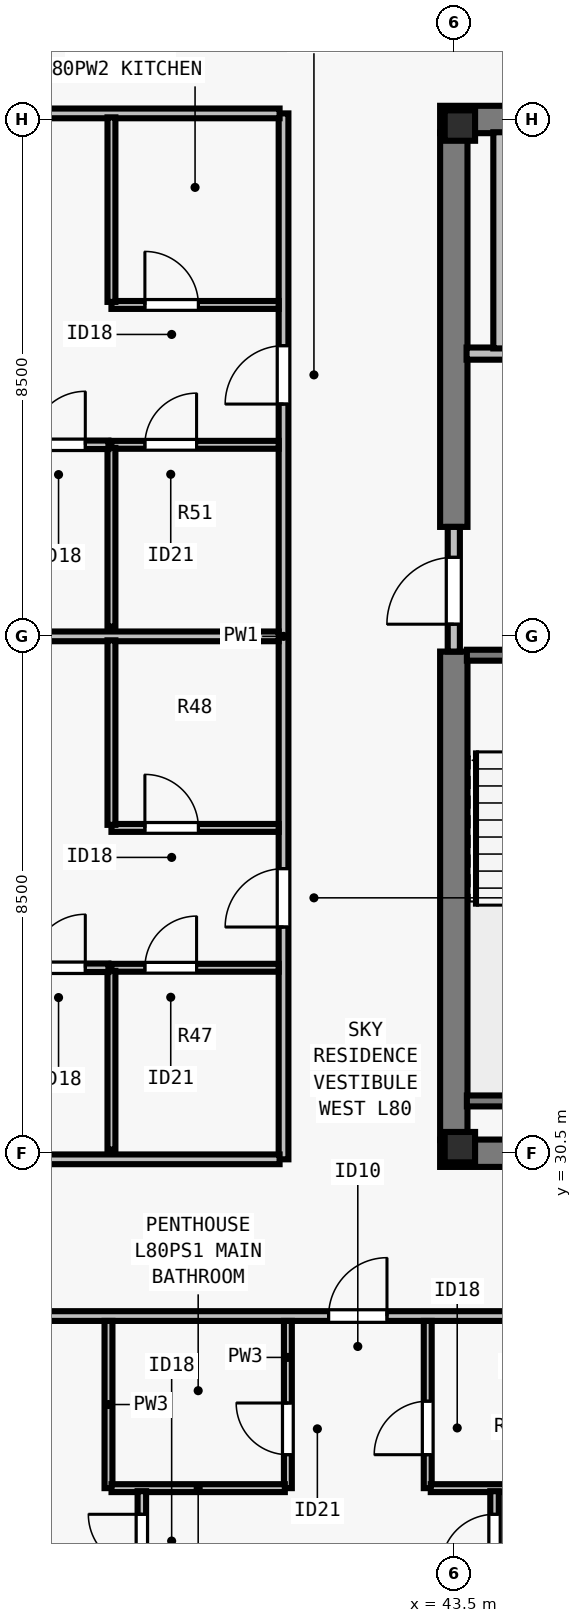
"""IFC4 building model, lengths in metres.
Left out: names, types, materials, properties, quantities, classifications, styles, units other than length and angle.
Written with IfcOpenShell. Run it as: python <this file> out.ifc"""

import sys

from ifc_helpers import new_model, si_unit, direction, frame, frame_2d, origin, origin_2d, place, context, subcontext, project, spatial, rectangle, i_section, extrude, element, fill, save


model = new_model("IFC4")
c1 = context("Model", 3, precision=1e-05, world=origin(), true_north=direction((0.0, 1.0)))
c2 = subcontext(c1, "Body", "Model", "MODEL_VIEW")
j1 = project(units=[si_unit("LENGTHUNIT", "METRE"), si_unit("PLANEANGLEUNIT", "RADIAN")], contexts=[c1])
p1 = place(None, origin())
s1 = spatial("IfcSite", under=j1, at=p1, CompositionType="ELEMENT")
p2 = place(p1, origin())
s2 = spatial("IfcBuilding", under=s1, at=p2, CompositionType="ELEMENT")
p3 = place(p2, frame((0.0, 0.0, 291.0)))
s3 = spatial("IfcBuildingStorey", under=s2, at=p3, CompositionType="ELEMENT", Elevation=291.0)
for number, where, z_axis, x_axis in (
    (1, (43.6, 30.6, 0.0), (0.0, 0.0, 1.0), (1.0, 0.0, 0.0)),
    (2, (43.6, 47.4, 0.0), (0.0, 0.0, 1.0), (1.0, 0.0, 0.0)),
):
    element("IfcColumn", number, at=place(p3, frame(where, z_axis=z_axis, x_axis=x_axis)), inside=s3, PredefinedType="COLUMN", context=c2, shape_type="SweptSolid", body=[
        extrude(i_section(OverallWidth=0.5, OverallDepth=0.5, WebThickness=0.028, FlangeThickness=0.045, at=origin_2d()), origin(), (0.0, 0.0, 1.0), 3.5),
    ])
for number, where, z_axis, x_axis in (
    (3, (43.275, 30.5, 0.0), (0.0, 0.0, 1.0), (1.0, 0.0, 0.0)),
    (4, (43.275, 47.5, 0.0), (0.0, 0.0, 1.0), (1.0, 0.0, 0.0)),
):
    element("IfcWall", number, at=place(p3, frame(where, z_axis=z_axis, x_axis=x_axis)), inside=s3, PredefinedType="SHEAR", context=c2, shape_type="SweptSolid", body=[
        extrude(rectangle(XDim=17.45, YDim=0.45, at=frame_2d((8.725, 0.0))), origin(), (0.0, 0.0, 1.0), 3.29),
    ])
p4 = place(p3, frame((43.5, 30.715, 0.0), z_axis=(0.0, 0.0, 1.0), x_axis=(0.0, 1.0, 0.0)))
e5 = element("IfcWall", 5, at=p4, inside=s3, PredefinedType="SHEAR", context=c2, shape_type="SweptSolid", body=[
    extrude(rectangle(XDim=8.035, YDim=0.45, at=frame_2d((4.018, 0.0))), origin(), (0.0, 0.0, 1.0), 3.29),
])
p5 = place(p3, frame((43.5, 40.8, 0.0), z_axis=(0.0, 0.0, 1.0), x_axis=(0.0, 1.0, 0.0)))
e6 = element("IfcWall", 6, at=p5, inside=s3, PredefinedType="SHEAR", context=c2, shape_type="SweptSolid", body=[
    extrude(rectangle(XDim=6.485, YDim=0.45, at=frame_2d((3.242, 0.0))), origin(), (0.0, 0.0, 1.0), 3.29),
])
p6 = place(p3, frame((43.5, 38.75, 0.0), z_axis=(0.0, 0.0, 1.0), x_axis=(0.0, 1.0, 0.0)))
e7 = element("IfcWall", 7, at=p6, inside=s3, PredefinedType="SOLIDWALL", context=c2, shape_type="SweptSolid", body=[
    extrude(rectangle(XDim=2.05, YDim=0.2, at=frame_2d((1.025, 0.0))), origin(), (0.0, 0.0, 1.0), 3.29),
])
p7 = place(p6, frame((0.45, 0.0, 0.0)))
e8 = element("IfcOpeningElement", 8, at=p7, cuts=e7, PredefinedType="OPENING", context=c2, shape_type="SweptSolid", body=[
    extrude(rectangle(XDim=1.1, YDim=2.15, at=frame_2d((0.55, 1.075))), frame((0.0, 0.11, 0.0), z_axis=(0.0, -1.0, 0.0), x_axis=(1.0, 0.0, 0.0)), (0.0, 0.0, 1.0), 0.22),
])
p8 = place(p3, frame((43.71, 43.65, 0.0), z_axis=(0.0, 0.0, 1.0), x_axis=(1.0, 0.0, 0.0)))
e9 = element("IfcWall", 9, at=p8, inside=s3, PredefinedType="SOLIDWALL", context=c2, shape_type="SweptSolid", body=[
    extrude(rectangle(XDim=3.555, YDim=0.2, at=frame_2d((1.777, 0.0))), origin(), (0.0, 0.0, 1.0), 3.29),
])
p9 = place(p8, frame((1.16, 0.0, 0.0)))
e10 = element("IfcOpeningElement", 10, at=p9, cuts=e9, PredefinedType="OPENING", context=c2, shape_type="SweptSolid", body=[
    extrude(rectangle(XDim=1.1, YDim=2.2, at=frame_2d((0.55, 1.1))), frame((0.0, 0.11, 0.0), z_axis=(0.0, -1.0, 0.0), x_axis=(1.0, 0.0, 0.0)), (0.0, 0.0, 1.0), 0.22),
])
p10 = place(p3, frame((44.25, 43.735, 0.0), z_axis=(0.0, 0.0, 1.0), x_axis=(0.0, 1.0, 0.0)))
e11 = element("IfcWall", 11, at=p10, inside=s3, PredefinedType="SOLIDWALL", context=c2, shape_type="SweptSolid", body=[
    extrude(rectangle(XDim=3.555, YDim=0.2, at=frame_2d((1.777, 0.0))), origin(), (0.0, 0.0, 1.0), 3.29),
])
p11 = place(p3, frame((31.285, 27.823, 0.0), z_axis=(0.0, 0.0, 1.0), x_axis=(1.0, 0.0, 0.0)))
e12 = element("IfcWall", 12, at=p11, inside=s3, PredefinedType="PARTITIONING", context=c2, shape_type="SweptSolid", body=[
    extrude(rectangle(XDim=41.3, YDim=0.16, at=frame_2d((20.65, 0.0))), origin(), (0.0, 0.0, 1.0), 3.009),
])
p12 = place(p11, frame((10.156, 0.0, 0.0)))
e13 = element("IfcOpeningElement", 13, at=p12, cuts=e12, PredefinedType="OPENING", context=c2, shape_type="SweptSolid", body=[
    extrude(rectangle(XDim=0.96, YDim=2.18, at=frame_2d((0.48, 1.09))), frame((0.0, 0.09, 0.0), z_axis=(0.0, -1.0, 0.0), x_axis=(1.0, 0.0, 0.0)), (0.0, 0.0, 1.0), 0.18),
])
p13 = place(p11, frame((30.736, 0.0, 0.0)))
e14 = element("IfcOpeningElement", 14, at=p13, cuts=e12, PredefinedType="OPENING", context=c2, shape_type="SweptSolid", body=[
    extrude(rectangle(XDim=0.96, YDim=2.18, at=frame_2d((0.48, 1.09))), frame((0.0, 0.09, 0.0), z_axis=(0.0, -1.0, 0.0), x_axis=(1.0, 0.0, 0.0)), (0.0, 0.0, 1.0), 0.18),
])
p14 = place(p3, frame((40.7, 30.4, 0.0), z_axis=(0.0, 0.0, 1.0), x_axis=(0.0, 1.0, 0.0)))
e15 = element("IfcWall", 15, at=p14, inside=s3, PredefinedType="PARTITIONING", context=c2, shape_type="SweptSolid", body=[
    extrude(rectangle(XDim=17.2, YDim=0.16, at=frame_2d((8.6, 0.0))), origin(), (0.0, 0.0, 1.0), 3.009),
])
p15 = place(p14, frame((3.82, 0.0, 0.0)))
e16 = element("IfcOpeningElement", 16, at=p15, cuts=e15, PredefinedType="OPENING", context=c2, shape_type="SweptSolid", body=[
    extrude(rectangle(XDim=0.96, YDim=2.18, at=frame_2d((0.48, 1.09))), frame((0.0, 0.09, 0.0), z_axis=(0.0, -1.0, 0.0), x_axis=(1.0, 0.0, 0.0)), (0.0, 0.0, 1.0), 0.18),
])
p16 = place(p14, frame((12.42, 0.0, 0.0)))
e17 = element("IfcOpeningElement", 17, at=p16, cuts=e15, PredefinedType="OPENING", context=c2, shape_type="SweptSolid", body=[
    extrude(rectangle(XDim=0.96, YDim=2.18, at=frame_2d((0.48, 1.09))), frame((0.0, 0.09, 0.0), z_axis=(0.0, -1.0, 0.0), x_axis=(1.0, 0.0, 0.0)), (0.0, 0.0, 1.0), 0.18),
])
for number, where, z_axis, x_axis in (
    (18, (31.285, 30.4, 0.0), (0.0, 0.0, 1.0), (1.0, 0.0, 0.0)),
    (19, (31.285, 47.6, 0.0), (0.0, 0.0, 1.0), (1.0, 0.0, 0.0)),
):
    element("IfcWall", number, at=place(p3, frame(where, z_axis=z_axis, x_axis=x_axis)), inside=s3, PredefinedType="PARTITIONING", context=c2, shape_type="SweptSolid", body=[
        extrude(rectangle(XDim=9.35, YDim=0.16, at=frame_2d((4.675, 0.0))), origin(), (0.0, 0.0, 1.0), 3.29),
    ])
p17 = place(p3, frame((37.821, 24.992, 0.0), z_axis=(0.0, 0.0, 1.0), x_axis=(0.0, 1.0, 0.0)))
e20 = element("IfcWall", 20, at=p17, inside=s3, PredefinedType="PLUMBINGWALL", context=c2, shape_type="SweptSolid", body=[
    extrude(rectangle(XDim=2.75, YDim=0.13, at=frame_2d((1.375, 0.0))), origin(), (0.0, 0.0, 1.0), 3.29),
])
p18 = place(p3, frame((40.771, 24.992, 0.0), z_axis=(0.0, 0.0, 1.0), x_axis=(0.0, 1.0, 0.0)))
e21 = element("IfcWall", 21, at=p18, inside=s3, PredefinedType="PLUMBINGWALL", context=c2, shape_type="SweptSolid", body=[
    extrude(rectangle(XDim=2.75, YDim=0.13, at=frame_2d((1.375, 0.0))), origin(), (0.0, 0.0, 1.0), 2.653),
])
p19 = place(p18, frame((0.55, 0.0, 0.0)))
e22 = element("IfcOpeningElement", 22, at=p19, cuts=e21, PredefinedType="OPENING", context=c2, shape_type="SweptSolid", body=[
    extrude(rectangle(XDim=0.85, YDim=2.08, at=frame_2d((0.425, 1.04))), frame((0.0, 0.075, 0.0), z_axis=(0.0, -1.0, 0.0), x_axis=(1.0, 0.0, 0.0)), (0.0, 0.0, 1.0), 0.15),
])
p20 = place(p3, frame((37.871, 24.992, 0.0), z_axis=(0.0, 0.0, 1.0), x_axis=(1.0, 0.0, 0.0)))
e23 = element("IfcWall", 23, at=p20, inside=s3, PredefinedType="PLUMBINGWALL", context=c2, shape_type="SweptSolid", body=[
    extrude(rectangle(XDim=2.85, YDim=0.13, at=frame_2d((1.425, 0.0))), origin(), (0.0, 0.0, 1.0), 3.29),
])
p21 = place(p3, frame((43.071, 24.992, 0.0), z_axis=(0.0, 0.0, 1.0), x_axis=(0.0, 1.0, 0.0)))
e24 = element("IfcWall", 24, at=p21, inside=s3, PredefinedType="PLUMBINGWALL", context=c2, shape_type="SweptSolid", body=[
    extrude(rectangle(XDim=2.75, YDim=0.13, at=frame_2d((1.375, 0.0))), origin(), (0.0, 0.0, 1.0), 3.29),
])
p22 = place(p21, frame((0.55, 0.0, 0.0)))
e25 = element("IfcOpeningElement", 25, at=p22, cuts=e24, PredefinedType="OPENING", context=c2, shape_type="SweptSolid", body=[
    extrude(rectangle(XDim=0.88, YDim=2.1, at=frame_2d((0.44, 1.05))), frame((0.0, 0.075, 0.0), z_axis=(0.0, -1.0, 0.0), x_axis=(1.0, 0.0, 0.0)), (0.0, 0.0, 1.0), 0.15),
])
p23 = place(p3, frame((43.121, 24.992, 0.0), z_axis=(0.0, 0.0, 1.0), x_axis=(1.0, 0.0, 0.0)))
e26 = element("IfcWall", 26, at=p23, inside=s3, PredefinedType="PLUMBINGWALL", context=c2, shape_type="SweptSolid", body=[
    extrude(rectangle(XDim=3.15, YDim=0.13, at=frame_2d((1.575, 0.0))), origin(), (0.0, 0.0, 1.0), 3.29),
])
p24 = place(p3, frame((38.37, 18.38, 0.0), z_axis=(0.0, 0.0, 1.0), x_axis=(0.0, 1.0, 0.0)))
e27 = element("IfcWall", 27, at=p24, inside=s3, PredefinedType="PARTITIONING", context=c2, shape_type="SweptSolid", body=[
    extrude(rectangle(XDim=6.562, YDim=0.14, at=frame_2d((3.281, 0.0))), origin(), (0.0, 0.0, 1.0), 2.653),
])
p25 = place(p24, frame((5.302, 0.0, 0.0)))
e28 = element("IfcOpeningElement", 28, at=p25, cuts=e27, PredefinedType="OPENING", context=c2, shape_type="SweptSolid", body=[
    extrude(rectangle(XDim=0.88, YDim=2.1, at=frame_2d((0.44, 1.05))), frame((0.0, 0.08, 0.0), z_axis=(0.0, -1.0, 0.0), x_axis=(1.0, 0.0, 0.0)), (0.0, 0.0, 1.0), 0.16),
])
p26 = place(p3, frame((44.17, 18.38, 0.0), z_axis=(0.0, 0.0, 1.0), x_axis=(0.0, 1.0, 0.0)))
e29 = element("IfcWall", 29, at=p26, inside=s3, PredefinedType="PARTITIONING", context=c2, shape_type="SweptSolid", body=[
    extrude(rectangle(XDim=6.562, YDim=0.14, at=frame_2d((3.281, 0.0))), origin(), (0.0, 0.0, 1.0), 3.29),
])
p27 = place(p26, frame((5.302, 0.0, 0.0)))
e30 = element("IfcOpeningElement", 30, at=p27, cuts=e29, PredefinedType="OPENING", context=c2, shape_type="SweptSolid", body=[
    extrude(rectangle(XDim=0.88, YDim=2.1, at=frame_2d((0.44, 1.05))), frame((0.0, 0.08, 0.0), z_axis=(0.0, -1.0, 0.0), x_axis=(1.0, 0.0, 0.0)), (0.0, 0.0, 1.0), 0.16),
])
p28 = place(p3, frame((31.285, 39.0, 0.0), z_axis=(0.0, 0.0, 1.0), x_axis=(1.0, 0.0, 0.0)))
e31 = element("IfcWall", 31, at=p28, inside=s3, PredefinedType="PARTITIONING", context=c2, shape_type="SweptSolid", body=[
    extrude(rectangle(XDim=9.335, YDim=0.16, at=frame_2d((4.667, 0.0))), origin(), (0.0, 0.0, 1.0), 3.29),
])
p29 = place(p3, frame((37.87, 33.55, 0.0), z_axis=(0.0, 0.0, 1.0), x_axis=(1.0, 0.0, 0.0)))
e32 = element("IfcWall", 32, at=p29, inside=s3, PredefinedType="PLUMBINGWALL", context=c2, shape_type="SweptSolid", body=[
    extrude(rectangle(XDim=2.75, YDim=0.13, at=frame_2d((1.375, 0.0))), origin(), (0.0, 0.0, 1.0), 3.29),
])
p30 = place(p29, frame((0.55, 0.0, 0.0)))
e33 = element("IfcOpeningElement", 33, at=p30, cuts=e32, PredefinedType="OPENING", context=c2, shape_type="SweptSolid", body=[
    extrude(rectangle(XDim=0.85, YDim=2.08, at=frame_2d((0.425, 1.04))), frame((0.0, 0.075, 0.0), z_axis=(0.0, -1.0, 0.0), x_axis=(1.0, 0.0, 0.0)), (0.0, 0.0, 1.0), 0.15),
])
p31 = place(p3, frame((37.87, 30.56, 0.0), z_axis=(0.0, 0.0, 1.0), x_axis=(0.0, 1.0, 0.0)))
e34 = element("IfcWall", 34, at=p31, inside=s3, PredefinedType="PLUMBINGWALL", context=c2, shape_type="SweptSolid", body=[
    extrude(rectangle(XDim=2.94, YDim=0.13, at=frame_2d((1.47, 0.0))), origin(), (0.0, 0.0, 1.0), 3.29),
])
p32 = place(p3, frame((37.87, 35.85, 0.0), z_axis=(0.0, 0.0, 1.0), x_axis=(1.0, 0.0, 0.0)))
e35 = element("IfcWall", 35, at=p32, inside=s3, PredefinedType="PLUMBINGWALL", context=c2, shape_type="SweptSolid", body=[
    extrude(rectangle(XDim=2.75, YDim=0.13, at=frame_2d((1.375, 0.0))), origin(), (0.0, 0.0, 1.0), 3.29),
])
p33 = place(p32, frame((0.55, 0.0, 0.0)))
e36 = element("IfcOpeningElement", 36, at=p33, cuts=e35, PredefinedType="OPENING", context=c2, shape_type="SweptSolid", body=[
    extrude(rectangle(XDim=0.88, YDim=2.1, at=frame_2d((0.44, 1.05))), frame((0.0, 0.075, 0.0), z_axis=(0.0, -1.0, 0.0), x_axis=(1.0, 0.0, 0.0)), (0.0, 0.0, 1.0), 0.15),
])
p34 = place(p3, frame((37.87, 35.9, 0.0), z_axis=(0.0, 0.0, 1.0), x_axis=(0.0, 1.0, 0.0)))
e37 = element("IfcWall", 37, at=p34, inside=s3, PredefinedType="PLUMBINGWALL", context=c2, shape_type="SweptSolid", body=[
    extrude(rectangle(XDim=3.035, YDim=0.13, at=frame_2d((1.518, 0.0))), origin(), (0.0, 0.0, 1.0), 3.29),
])
p35 = place(p3, frame((31.38, 33.55, 0.0), z_axis=(0.0, 0.0, 1.0), x_axis=(1.0, 0.0, 0.0)))
e38 = element("IfcWall", 38, at=p35, inside=s3, PredefinedType="PARTITIONING", context=c2, shape_type="SweptSolid", body=[
    extrude(rectangle(XDim=6.44, YDim=0.14, at=frame_2d((3.22, 0.0))), origin(), (0.0, 0.0, 1.0), 2.653),
])
p36 = place(p35, frame((5.18, 0.0, 0.0)))
e39 = element("IfcOpeningElement", 39, at=p36, cuts=e38, PredefinedType="OPENING", context=c2, shape_type="SweptSolid", body=[
    extrude(rectangle(XDim=0.88, YDim=2.1, at=frame_2d((0.44, 1.05))), frame((0.0, 0.08, 0.0), z_axis=(0.0, -1.0, 0.0), x_axis=(1.0, 0.0, 0.0)), (0.0, 0.0, 1.0), 0.16),
])
p37 = place(p3, frame((37.87, 42.15, 0.0), z_axis=(0.0, 0.0, 1.0), x_axis=(1.0, 0.0, 0.0)))
e40 = element("IfcWall", 40, at=p37, inside=s3, PredefinedType="PLUMBINGWALL", context=c2, shape_type="SweptSolid", body=[
    extrude(rectangle(XDim=2.75, YDim=0.13, at=frame_2d((1.375, 0.0))), origin(), (0.0, 0.0, 1.0), 3.29),
])
p38 = place(p37, frame((0.55, 0.0, 0.0)))
e41 = element("IfcOpeningElement", 41, at=p38, cuts=e40, PredefinedType="OPENING", context=c2, shape_type="SweptSolid", body=[
    extrude(rectangle(XDim=0.85, YDim=2.08, at=frame_2d((0.425, 1.04))), frame((0.0, 0.075, 0.0), z_axis=(0.0, -1.0, 0.0), x_axis=(1.0, 0.0, 0.0)), (0.0, 0.0, 1.0), 0.15),
])
p39 = place(p3, frame((37.87, 39.16, 0.0), z_axis=(0.0, 0.0, 1.0), x_axis=(0.0, 1.0, 0.0)))
e42 = element("IfcWall", 42, at=p39, inside=s3, PredefinedType="PLUMBINGWALL", context=c2, shape_type="SweptSolid", body=[
    extrude(rectangle(XDim=2.94, YDim=0.13, at=frame_2d((1.47, 0.0))), origin(), (0.0, 0.0, 1.0), 3.009),
])
p40 = place(p3, frame((37.87, 44.45, 0.0), z_axis=(0.0, 0.0, 1.0), x_axis=(1.0, 0.0, 0.0)))
e43 = element("IfcWall", 43, at=p40, inside=s3, PredefinedType="PLUMBINGWALL", context=c2, shape_type="SweptSolid", body=[
    extrude(rectangle(XDim=2.75, YDim=0.13, at=frame_2d((1.375, 0.0))), origin(), (0.0, 0.0, 1.0), 3.29),
])
p41 = place(p40, frame((0.55, 0.0, 0.0)))
e44 = element("IfcOpeningElement", 44, at=p41, cuts=e43, PredefinedType="OPENING", context=c2, shape_type="SweptSolid", body=[
    extrude(rectangle(XDim=0.88, YDim=2.1, at=frame_2d((0.44, 1.05))), frame((0.0, 0.075, 0.0), z_axis=(0.0, -1.0, 0.0), x_axis=(1.0, 0.0, 0.0)), (0.0, 0.0, 1.0), 0.15),
])
p42 = place(p3, frame((37.87, 44.5, 0.0), z_axis=(0.0, 0.0, 1.0), x_axis=(0.0, 1.0, 0.0)))
e45 = element("IfcWall", 45, at=p42, inside=s3, PredefinedType="PLUMBINGWALL", context=c2, shape_type="SweptSolid", body=[
    extrude(rectangle(XDim=3.035, YDim=0.13, at=frame_2d((1.518, 0.0))), origin(), (0.0, 0.0, 1.0), 3.29),
])
p43 = place(p3, frame((31.38, 42.15, 0.0), z_axis=(0.0, 0.0, 1.0), x_axis=(1.0, 0.0, 0.0)))
e46 = element("IfcWall", 46, at=p43, inside=s3, PredefinedType="PARTITIONING", context=c2, shape_type="SweptSolid", body=[
    extrude(rectangle(XDim=6.44, YDim=0.14, at=frame_2d((3.22, 0.0))), origin(), (0.0, 0.0, 1.0), 3.29),
])
p44 = place(p43, frame((5.18, 0.0, 0.0)))
e47 = element("IfcOpeningElement", 47, at=p44, cuts=e46, PredefinedType="OPENING", context=c2, shape_type="SweptSolid", body=[
    extrude(rectangle(XDim=0.88, YDim=2.1, at=frame_2d((0.44, 1.05))), frame((0.0, 0.08, 0.0), z_axis=(0.0, -1.0, 0.0), x_axis=(1.0, 0.0, 0.0)), (0.0, 0.0, 1.0), 0.16),
])
p45 = place(p3, frame((43.715, 38.69, 0.0), z_axis=(0.0, 0.0, 1.0), x_axis=(1.0, 0.0, 0.0)))
e48 = element("IfcWall", 48, at=p45, inside=s3, PredefinedType="SOLIDWALL", context=c2, shape_type="SweptSolid", body=[
    extrude(rectangle(XDim=3.28, YDim=0.18, at=frame_2d((1.64, 0.0))), origin(), (0.0, 0.0, 1.0), 3.29),
])
p46 = place(p45, frame((1.165, 0.0, 0.0)))
e49 = element("IfcOpeningElement", 49, at=p46, cuts=e48, PredefinedType="OPENING", context=c2, shape_type="SweptSolid", body=[
    extrude(rectangle(XDim=0.95, YDim=2.15, at=frame_2d((0.475, 1.075))), frame((0.0, 0.1, 0.0), z_axis=(0.0, -1.0, 0.0), x_axis=(1.0, 0.0, 0.0)), (0.0, 0.0, 1.0), 0.2),
])
p47 = place(p3, frame((43.715, 31.36, 0.0), z_axis=(0.0, 0.0, 1.0), x_axis=(1.0, 0.0, 0.0)))
e50 = element("IfcWall", 50, at=p47, inside=s3, PredefinedType="SOLIDWALL", context=c2, shape_type="SweptSolid", body=[
    extrude(rectangle(XDim=3.28, YDim=0.18, at=frame_2d((1.64, 0.0))), origin(), (0.0, 0.0, 1.0), 3.29),
])
p48 = place(p7, origin())
e51 = element("IfcDoor", 51, at=p48, inside=s3, OperationType="SINGLE_SWING_LEFT", PredefinedType="DOOR", context=c2, shape_type="SweptSolid", body=[
    extrude(rectangle(XDim=1.1, YDim=2.15, at=frame_2d((0.55, 1.075))), frame((0.0, 0.025, 0.0), z_axis=(0.0, -1.0, 0.0), x_axis=(1.0, 0.0, 0.0)), (0.0, 0.0, 1.0), 0.05),
])
fill(e8, e51)
p49 = place(p19, origin())
e52 = element("IfcDoor", 52, at=p49, inside=s3, OperationType="SINGLE_SWING_RIGHT", PredefinedType="DOOR", context=c2, shape_type="SweptSolid", body=[
    extrude(rectangle(XDim=0.85, YDim=2.08, at=frame_2d((0.425, 1.04))), frame((0.0, 0.025, 0.0), z_axis=(0.0, -1.0, 0.0), x_axis=(1.0, 0.0, 0.0)), (0.0, 0.0, 1.0), 0.05),
])
fill(e22, e52)
p50 = place(p22, origin())
e53 = element("IfcDoor", 53, at=p50, inside=s3, OperationType="SINGLE_SWING_LEFT", PredefinedType="DOOR", context=c2, shape_type="SweptSolid", body=[
    extrude(rectangle(XDim=0.88, YDim=2.1, at=frame_2d((0.44, 1.05))), frame((0.0, 0.025, 0.0), z_axis=(0.0, -1.0, 0.0), x_axis=(1.0, 0.0, 0.0)), (0.0, 0.0, 1.0), 0.05),
])
fill(e25, e53)
p51 = place(p25, origin())
e54 = element("IfcDoor", 54, at=p51, inside=s3, OperationType="SINGLE_SWING_RIGHT", PredefinedType="DOOR", context=c2, shape_type="SweptSolid", body=[
    extrude(rectangle(XDim=0.88, YDim=2.1, at=frame_2d((0.44, 1.05))), frame((0.0, 0.025, 0.0), z_axis=(0.0, -1.0, 0.0), x_axis=(1.0, 0.0, 0.0)), (0.0, 0.0, 1.0), 0.05),
])
fill(e28, e54)
p52 = place(p27, origin())
e55 = element("IfcDoor", 55, at=p52, inside=s3, OperationType="SINGLE_SWING_LEFT", PredefinedType="DOOR", context=c2, shape_type="SweptSolid", body=[
    extrude(rectangle(XDim=0.88, YDim=2.1, at=frame_2d((0.44, 1.05))), frame((0.0, 0.025, 0.0), z_axis=(0.0, -1.0, 0.0), x_axis=(1.0, 0.0, 0.0)), (0.0, 0.0, 1.0), 0.05),
])
fill(e30, e55)
p53 = place(p12, origin())
e56 = element("IfcDoor", 56, at=p53, inside=s3, OperationType="SINGLE_SWING_RIGHT", PredefinedType="DOOR", context=c2, shape_type="SweptSolid", body=[
    extrude(rectangle(XDim=0.96, YDim=2.18, at=frame_2d((0.48, 1.09))), frame((0.0, 0.025, 0.0), z_axis=(0.0, -1.0, 0.0), x_axis=(1.0, 0.0, 0.0)), (0.0, 0.0, 1.0), 0.05),
])
fill(e13, e56)
p54 = place(p30, origin())
e57 = element("IfcDoor", 57, at=p54, inside=s3, OperationType="SINGLE_SWING_RIGHT", PredefinedType="DOOR", context=c2, shape_type="SweptSolid", body=[
    extrude(rectangle(XDim=0.85, YDim=2.08, at=frame_2d((0.425, 1.04))), frame((0.0, 0.025, 0.0), z_axis=(0.0, -1.0, 0.0), x_axis=(1.0, 0.0, 0.0)), (0.0, 0.0, 1.0), 0.05),
])
fill(e33, e57)
p55 = place(p33, origin())
e58 = element("IfcDoor", 58, at=p55, inside=s3, OperationType="SINGLE_SWING_LEFT", PredefinedType="DOOR", context=c2, shape_type="SweptSolid", body=[
    extrude(rectangle(XDim=0.88, YDim=2.1, at=frame_2d((0.44, 1.05))), frame((0.0, 0.025, 0.0), z_axis=(0.0, -1.0, 0.0), x_axis=(1.0, 0.0, 0.0)), (0.0, 0.0, 1.0), 0.05),
])
fill(e36, e58)
p56 = place(p36, origin())
e59 = element("IfcDoor", 59, at=p56, inside=s3, OperationType="SINGLE_SWING_RIGHT", PredefinedType="DOOR", context=c2, shape_type="SweptSolid", body=[
    extrude(rectangle(XDim=0.88, YDim=2.1, at=frame_2d((0.44, 1.05))), frame((0.0, 0.025, 0.0), z_axis=(0.0, -1.0, 0.0), x_axis=(1.0, 0.0, 0.0)), (0.0, 0.0, 1.0), 0.05),
])
fill(e39, e59)
p57 = place(p15, origin())
e60 = element("IfcDoor", 60, at=p57, inside=s3, OperationType="SINGLE_SWING_LEFT", PredefinedType="DOOR", context=c2, shape_type="SweptSolid", body=[
    extrude(rectangle(XDim=0.96, YDim=2.18, at=frame_2d((0.48, 1.09))), frame((0.0, 0.025, 0.0), z_axis=(0.0, -1.0, 0.0), x_axis=(1.0, 0.0, 0.0)), (0.0, 0.0, 1.0), 0.05),
])
fill(e16, e60)
p58 = place(p38, origin())
e61 = element("IfcDoor", 61, at=p58, inside=s3, OperationType="SINGLE_SWING_RIGHT", PredefinedType="DOOR", context=c2, shape_type="SweptSolid", body=[
    extrude(rectangle(XDim=0.85, YDim=2.08, at=frame_2d((0.425, 1.04))), frame((0.0, 0.025, 0.0), z_axis=(0.0, -1.0, 0.0), x_axis=(1.0, 0.0, 0.0)), (0.0, 0.0, 1.0), 0.05),
])
fill(e41, e61)
p59 = place(p41, origin())
e62 = element("IfcDoor", 62, at=p59, inside=s3, OperationType="SINGLE_SWING_LEFT", PredefinedType="DOOR", context=c2, shape_type="SweptSolid", body=[
    extrude(rectangle(XDim=0.88, YDim=2.1, at=frame_2d((0.44, 1.05))), frame((0.0, 0.025, 0.0), z_axis=(0.0, -1.0, 0.0), x_axis=(1.0, 0.0, 0.0)), (0.0, 0.0, 1.0), 0.05),
])
fill(e44, e62)
p60 = place(p44, origin())
e63 = element("IfcDoor", 63, at=p60, inside=s3, OperationType="SINGLE_SWING_RIGHT", PredefinedType="DOOR", context=c2, shape_type="SweptSolid", body=[
    extrude(rectangle(XDim=0.88, YDim=2.1, at=frame_2d((0.44, 1.05))), frame((0.0, 0.025, 0.0), z_axis=(0.0, -1.0, 0.0), x_axis=(1.0, 0.0, 0.0)), (0.0, 0.0, 1.0), 0.05),
])
fill(e47, e63)
p61 = place(p16, origin())
e64 = element("IfcDoor", 64, at=p61, inside=s3, OperationType="SINGLE_SWING_LEFT", PredefinedType="DOOR", context=c2, shape_type="SweptSolid", body=[
    extrude(rectangle(XDim=0.96, YDim=2.18, at=frame_2d((0.48, 1.09))), frame((0.0, 0.025, 0.0), z_axis=(0.0, -1.0, 0.0), x_axis=(1.0, 0.0, 0.0)), (0.0, 0.0, 1.0), 0.05),
])
fill(e17, e64)
save(model, sys.argv[1])
